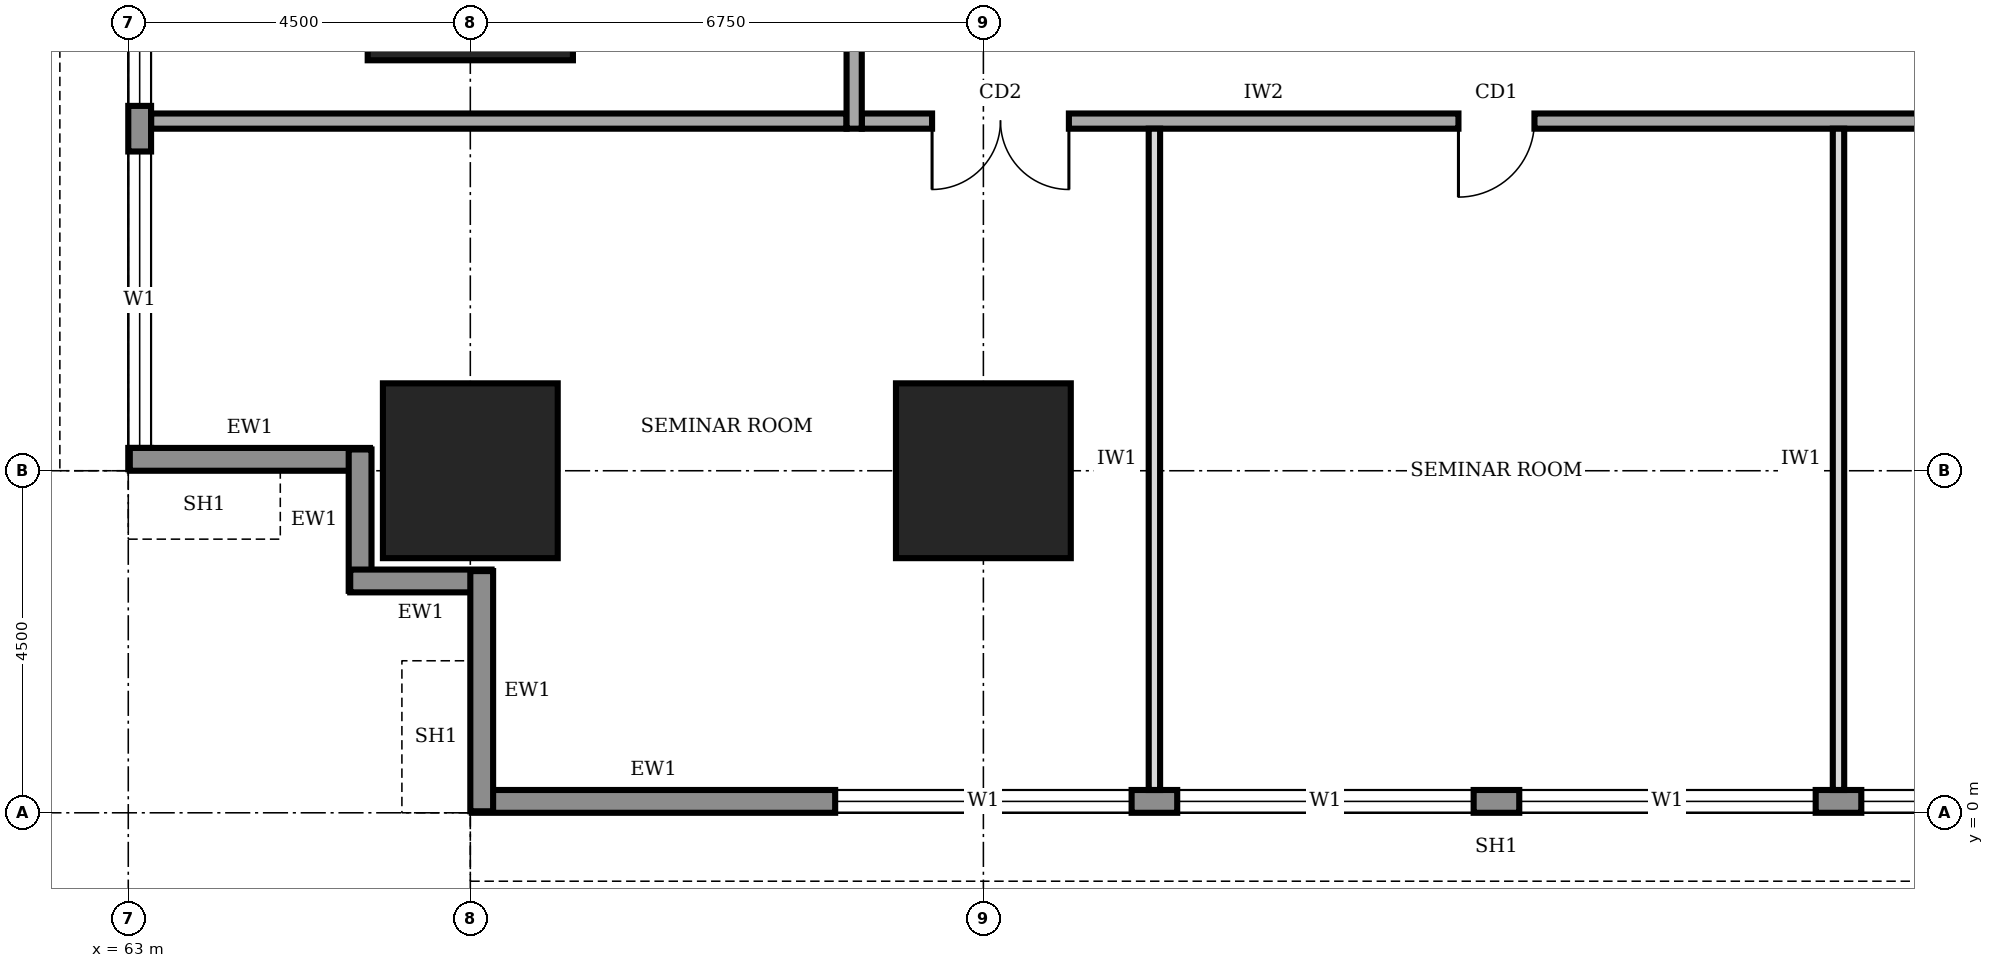
"""IFC4 building model, lengths in metres.
Left out: names, types, materials, properties, quantities, classifications, styles, units other than length and angle.
Written with IfcOpenShell. Run it as: python <this file> out.ifc"""

import sys

from ifc_helpers import new_model, si_unit, direction, frame, frame_2d, origin, origin_2d, place, context, subcontext, project, spatial, rectangle, extrude, element, fill, save


model = new_model("IFC4")
c1 = context("Model", 3, precision=1e-05, world=origin(), true_north=direction((0.0, 1.0)))
c2 = subcontext(c1, "Body", "Model", "MODEL_VIEW")
j1 = project(units=[si_unit("LENGTHUNIT", "METRE"), si_unit("PLANEANGLEUNIT", "RADIAN")], contexts=[c1])
p1 = place(None, origin())
s1 = spatial("IfcSite", under=j1, at=p1, CompositionType="ELEMENT")
p2 = place(p1, origin())
s2 = spatial("IfcBuilding", under=s1, at=p2, CompositionType="ELEMENT")
p3 = place(p2, frame((0.0, 0.0, 25.0)))
s3 = spatial("IfcBuildingStorey", under=s2, at=p3, CompositionType="ELEMENT", Elevation=25.0)
for number, where, z_axis, x_axis in (
    (1, (67.5, 4.5, 0.0), (0.0, 0.0, 1.0), (1.0, 0.0, 0.0)),
    (2, (74.25, 4.5, 0.0), (0.0, 0.0, 1.0), (1.0, 0.0, 0.0)),
):
    element("IfcColumn", number, at=place(p3, frame(where, z_axis=z_axis, x_axis=x_axis)), inside=s3, PredefinedType="COLUMN", context=c2, shape_type="SweptSolid", body=[
        extrude(rectangle(XDim=2.3, YDim=2.3, at=origin_2d()), origin(), (0.0, 0.0, 1.0), 4.0),
    ])
p4 = place(p3, frame((67.5, 11.25, 0.0), z_axis=(0.0, 0.0, 1.0), x_axis=(1.0, 0.0, 0.0)))
e3 = element("IfcColumn", 3, at=p4, inside=s3, PredefinedType="COLUMN", context=c2, shape_type="SweptSolid", body=[
    extrude(rectangle(XDim=2.7, YDim=2.7, at=origin_2d()), origin(), (0.0, 0.0, 1.0), 4.0),
])
p5 = place(p3, frame((67.52, 0.15, 0.0), z_axis=(0.0, 0.0, 1.0), x_axis=(1.0, 0.0, 0.0)))
e4 = element("IfcWall", 4, at=p5, inside=s3, PredefinedType="STANDARD", context=c2, shape_type="SweptSolid", body=[
    extrude(rectangle(XDim=26.96, YDim=0.3, at=frame_2d((13.48, 0.0))), origin(), (0.0, 0.0, 1.0), 3.75),
])
p6 = place(p5, frame((4.78, 0.0, 0.9)))
e5 = element("IfcOpeningElement", 5, at=p6, cuts=e4, PredefinedType="OPENING", context=c2, shape_type="SweptSolid", body=[
    extrude(rectangle(XDim=3.9, YDim=2.2, at=frame_2d((1.95, 1.1))), frame((0.0, 0.16, 0.0), z_axis=(0.0, -1.0, 0.0), x_axis=(1.0, 0.0, 0.0)), (0.0, 0.0, 1.0), 0.32),
])
p7 = place(p5, frame((9.28, 0.0, 0.9)))
e6 = element("IfcOpeningElement", 6, at=p7, cuts=e4, PredefinedType="OPENING", context=c2, shape_type="SweptSolid", body=[
    extrude(rectangle(XDim=3.9, YDim=2.2, at=frame_2d((1.95, 1.1))), frame((0.0, 0.16, 0.0), z_axis=(0.0, -1.0, 0.0), x_axis=(1.0, 0.0, 0.0)), (0.0, 0.0, 1.0), 0.32),
])
p8 = place(p5, frame((13.78, 0.0, 0.9)))
e7 = element("IfcOpeningElement", 7, at=p8, cuts=e4, PredefinedType="OPENING", context=c2, shape_type="SweptSolid", body=[
    extrude(rectangle(XDim=3.9, YDim=2.2, at=frame_2d((1.95, 1.1))), frame((0.0, 0.16, 0.0), z_axis=(0.0, -1.0, 0.0), x_axis=(1.0, 0.0, 0.0)), (0.0, 0.0, 1.0), 0.32),
])
p9 = place(p5, frame((18.28, 0.0, 0.9)))
e8 = element("IfcOpeningElement", 8, at=p9, cuts=e4, PredefinedType="OPENING", context=c2, shape_type="SweptSolid", body=[
    extrude(rectangle(XDim=3.9, YDim=2.2, at=frame_2d((1.95, 1.1))), frame((0.0, 0.16, 0.0), z_axis=(0.0, -1.0, 0.0), x_axis=(1.0, 0.0, 0.0)), (0.0, 0.0, 1.0), 0.32),
])
p10 = place(p5, frame((22.78, 0.0, 0.9)))
e9 = element("IfcOpeningElement", 9, at=p10, cuts=e4, PredefinedType="OPENING", context=c2, shape_type="SweptSolid", body=[
    extrude(rectangle(XDim=3.9, YDim=2.2, at=frame_2d((1.95, 1.1))), frame((0.0, 0.16, 0.0), z_axis=(0.0, -1.0, 0.0), x_axis=(1.0, 0.0, 0.0)), (0.0, 0.0, 1.0), 0.32),
])
p11 = place(p3, frame((63.15, 35.98, 0.0), z_axis=(0.0, 0.0, 1.0), x_axis=(0.0, -1.0, 0.0)))
e10 = element("IfcWall", 10, at=p11, inside=s3, PredefinedType="STANDARD", context=c2, shape_type="SweptSolid", body=[
    extrude(rectangle(XDim=31.46, YDim=0.3, at=frame_2d((15.73, 0.0))), origin(), (0.0, 0.0, 1.0), 3.75),
])
p12 = place(p11, frame((27.28, 0.0, 0.9)))
e11 = element("IfcOpeningElement", 11, at=p12, cuts=e10, PredefinedType="OPENING", context=c2, shape_type="SweptSolid", body=[
    extrude(rectangle(XDim=3.9, YDim=2.2, at=frame_2d((1.95, 1.1))), frame((0.0, 0.16, 0.0), z_axis=(0.0, -1.0, 0.0), x_axis=(1.0, 0.0, 0.0)), (0.0, 0.0, 1.0), 0.32),
])
p13 = place(p11, frame((22.78, 0.0, 0.9)))
e12 = element("IfcOpeningElement", 12, at=p13, cuts=e10, PredefinedType="OPENING", context=c2, shape_type="SweptSolid", body=[
    extrude(rectangle(XDim=3.9, YDim=2.2, at=frame_2d((1.95, 1.1))), frame((0.0, 0.16, 0.0), z_axis=(0.0, -1.0, 0.0), x_axis=(1.0, 0.0, 0.0)), (0.0, 0.0, 1.0), 0.32),
])
p14 = place(p11, frame((18.28, 0.0, 0.9)))
e13 = element("IfcOpeningElement", 13, at=p14, cuts=e10, PredefinedType="OPENING", context=c2, shape_type="SweptSolid", body=[
    extrude(rectangle(XDim=3.9, YDim=2.2, at=frame_2d((1.95, 1.1))), frame((0.0, 0.16, 0.0), z_axis=(0.0, -1.0, 0.0), x_axis=(1.0, 0.0, 0.0)), (0.0, 0.0, 1.0), 0.32),
])
p15 = place(p11, frame((13.78, 0.0, 0.9)))
e14 = element("IfcOpeningElement", 14, at=p15, cuts=e10, PredefinedType="OPENING", context=c2, shape_type="SweptSolid", body=[
    extrude(rectangle(XDim=3.9, YDim=2.2, at=frame_2d((1.95, 1.1))), frame((0.0, 0.16, 0.0), z_axis=(0.0, -1.0, 0.0), x_axis=(1.0, 0.0, 0.0)), (0.0, 0.0, 1.0), 0.32),
])
p16 = place(p11, frame((9.28, 0.0, 0.9)))
e15 = element("IfcOpeningElement", 15, at=p16, cuts=e10, PredefinedType="OPENING", context=c2, shape_type="SweptSolid", body=[
    extrude(rectangle(XDim=3.9, YDim=2.2, at=frame_2d((1.95, 1.1))), frame((0.0, 0.16, 0.0), z_axis=(0.0, -1.0, 0.0), x_axis=(1.0, 0.0, 0.0)), (0.0, 0.0, 1.0), 0.32),
])
p17 = place(p11, frame((4.78, 0.0, 0.9)))
e16 = element("IfcOpeningElement", 16, at=p17, cuts=e10, PredefinedType="OPENING", context=c2, shape_type="SweptSolid", body=[
    extrude(rectangle(XDim=3.9, YDim=2.2, at=frame_2d((1.95, 1.1))), frame((0.0, 0.16, 0.0), z_axis=(0.0, -1.0, 0.0), x_axis=(1.0, 0.0, 0.0)), (0.0, 0.0, 1.0), 0.32),
])
p18 = place(p3, frame((63.02, 4.65, 0.0), z_axis=(0.0, 0.0, 1.0), x_axis=(1.0, 0.0, 0.0)))
e17 = element("IfcWall", 17, at=p18, inside=s3, PredefinedType="STANDARD", context=c2, shape_type="SweptSolid", body=[
    extrude(rectangle(XDim=3.16, YDim=0.3, at=frame_2d((1.58, 0.0))), origin(), (0.0, 0.0, 1.0), 2.85),
])
for number, where, z_axis, x_axis in (
    (18, (66.05, 4.78, 0.0), (0.0, 0.0, 1.0), (0.0, -1.0, 0.0)),
    (19, (65.92, 3.05, 0.0), (0.0, 0.0, 1.0), (1.0, 0.0, 0.0)),
):
    element("IfcWall", number, at=place(p3, frame(where, z_axis=z_axis, x_axis=x_axis)), inside=s3, PredefinedType="STANDARD", context=c2, shape_type="SweptSolid", body=[
        extrude(rectangle(XDim=1.86, YDim=0.3, at=frame_2d((0.93, 0.0))), origin(), (0.0, 0.0, 1.0), 3.75),
    ])
p19 = place(p3, frame((67.65, 3.18, 0.0), z_axis=(0.0, 0.0, 1.0), x_axis=(0.0, -1.0, 0.0)))
e20 = element("IfcWall", 20, at=p19, inside=s3, PredefinedType="STANDARD", context=c2, shape_type="SweptSolid", body=[
    extrude(rectangle(XDim=3.16, YDim=0.3, at=frame_2d((1.58, 0.0))), origin(), (0.0, 0.0, 1.0), 2.85),
])
p20 = place(p3, frame((72.65, 9.1, 0.0), z_axis=(0.0, 0.0, 1.0), x_axis=(1.0, 0.0, 0.0)))
e21 = element("IfcWall", 21, at=p20, inside=s3, PredefinedType="SOLIDWALL", context=c2, shape_type="SweptSolid", body=[
    extrude(rectangle(XDim=16.9, YDim=0.2, at=frame_2d((8.45, 0.0))), origin(), (0.0, 0.0, 1.0), 3.75),
])
p21 = place(p20, frame((0.925, 0.0, 0.0)))
e22 = element("IfcOpeningElement", 22, at=p21, cuts=e21, PredefinedType="OPENING", context=c2, shape_type="SweptSolid", body=[
    extrude(rectangle(XDim=1.8, YDim=2.1, at=frame_2d((0.9, 1.05))), frame((0.0, 0.11, 0.0), z_axis=(0.0, -1.0, 0.0), x_axis=(1.0, 0.0, 0.0)), (0.0, 0.0, 1.0), 0.22),
])
p22 = place(p20, frame((7.85, 0.0, 0.0)))
e23 = element("IfcOpeningElement", 23, at=p22, cuts=e21, PredefinedType="OPENING", context=c2, shape_type="SweptSolid", body=[
    extrude(rectangle(XDim=1.0, YDim=2.1, at=frame_2d((0.5, 1.05))), frame((0.0, 0.11, 0.0), z_axis=(0.0, -1.0, 0.0), x_axis=(1.0, 0.0, 0.0)), (0.0, 0.0, 1.0), 0.22),
])
p23 = place(p20, frame((13.975, 0.0, 0.0)))
e24 = element("IfcOpeningElement", 24, at=p23, cuts=e21, PredefinedType="OPENING", context=c2, shape_type="SweptSolid", body=[
    extrude(rectangle(XDim=1.8, YDim=2.1, at=frame_2d((0.9, 1.05))), frame((0.0, 0.11, 0.0), z_axis=(0.0, -1.0, 0.0), x_axis=(1.0, 0.0, 0.0)), (0.0, 0.0, 1.0), 0.22),
])
p24 = place(p3, frame((72.55, 32.8, 0.0), z_axis=(0.0, 0.0, 1.0), x_axis=(0.0, -1.0, 0.0)))
e25 = element("IfcWall", 25, at=p24, inside=s3, PredefinedType="SOLIDWALL", context=c2, shape_type="SweptSolid", body=[
    extrude(rectangle(XDim=23.8, YDim=0.2, at=frame_2d((11.9, 0.0))), origin(), (0.0, 0.0, 1.0), 3.75),
])
p25 = place(p24, frame((21.05, 0.0, 0.0)))
e26 = element("IfcOpeningElement", 26, at=p25, cuts=e25, PredefinedType="OPENING", context=c2, shape_type="SweptSolid", body=[
    extrude(rectangle(XDim=1.0, YDim=2.1, at=frame_2d((0.5, 1.05))), frame((0.0, 0.11, 0.0), z_axis=(0.0, -1.0, 0.0), x_axis=(1.0, 0.0, 0.0)), (0.0, 0.0, 1.0), 0.22),
])
p26 = place(p24, frame((16.55, 0.0, 0.0)))
e27 = element("IfcOpeningElement", 27, at=p26, cuts=e25, PredefinedType="OPENING", context=c2, shape_type="SweptSolid", body=[
    extrude(rectangle(XDim=1.0, YDim=2.1, at=frame_2d((0.5, 1.05))), frame((0.0, 0.11, 0.0), z_axis=(0.0, -1.0, 0.0), x_axis=(1.0, 0.0, 0.0)), (0.0, 0.0, 1.0), 0.22),
])
p27 = place(p24, frame((12.05, 0.0, 0.0)))
e28 = element("IfcOpeningElement", 28, at=p27, cuts=e25, PredefinedType="OPENING", context=c2, shape_type="SweptSolid", body=[
    extrude(rectangle(XDim=1.0, YDim=2.1, at=frame_2d((0.5, 1.05))), frame((0.0, 0.11, 0.0), z_axis=(0.0, -1.0, 0.0), x_axis=(1.0, 0.0, 0.0)), (0.0, 0.0, 1.0), 0.22),
])
p28 = place(p24, frame((7.55, 0.0, 0.0)))
e29 = element("IfcOpeningElement", 29, at=p28, cuts=e25, PredefinedType="OPENING", context=c2, shape_type="SweptSolid", body=[
    extrude(rectangle(XDim=1.0, YDim=2.1, at=frame_2d((0.5, 1.05))), frame((0.0, 0.11, 0.0), z_axis=(0.0, -1.0, 0.0), x_axis=(1.0, 0.0, 0.0)), (0.0, 0.0, 1.0), 0.22),
])
p29 = place(p24, frame((2.3, 0.0, 0.0)))
e30 = element("IfcOpeningElement", 30, at=p29, cuts=e25, PredefinedType="OPENING", context=c2, shape_type="SweptSolid", body=[
    extrude(rectangle(XDim=1.0, YDim=2.1, at=frame_2d((0.5, 1.05))), frame((0.0, 0.11, 0.0), z_axis=(0.0, -1.0, 0.0), x_axis=(1.0, 0.0, 0.0)), (0.0, 0.0, 1.0), 0.22),
])
p30 = place(p3, frame((63.3, 9.1, 0.0), z_axis=(0.0, 0.0, 1.0), x_axis=(1.0, 0.0, 0.0)))
e31 = element("IfcWall", 31, at=p30, inside=s3, PredefinedType="SOLIDWALL", context=c2, shape_type="SweptSolid", body=[
    extrude(rectangle(XDim=9.15, YDim=0.2, at=frame_2d((4.575, 0.0))), origin(), (0.0, 0.0, 1.0), 3.75),
])
for number, where, z_axis, x_axis in (
    (32, (76.5, 0.3, 0.0), (0.0, 0.0, 1.0), (0.0, 1.0, 0.0)),
    (33, (85.5, 0.3, 0.0), (0.0, 0.0, 1.0), (0.0, 1.0, 0.0)),
):
    element("IfcWall", number, at=place(p3, frame(where, z_axis=z_axis, x_axis=x_axis)), inside=s3, PredefinedType="PARTITIONING", context=c2, shape_type="SweptSolid", body=[
        extrude(rectangle(XDim=8.7, YDim=0.15, at=frame_2d((4.35, 0.0))), origin(), (0.0, 0.0, 1.0), 3.75),
    ])
p31 = place(p6, origin())
e34 = element("IfcWindow", 34, at=p31, inside=s3, PartitioningType="SINGLE_PANEL", PredefinedType="WINDOW", context=c2, shape_type="SweptSolid", body=[
    extrude(rectangle(XDim=3.9, YDim=2.2, at=frame_2d((1.95, 1.1))), frame((0.0, 0.03, 0.0), z_axis=(0.0, -1.0, 0.0), x_axis=(1.0, 0.0, 0.0)), (0.0, 0.0, 1.0), 0.06),
])
fill(e5, e34)
p32 = place(p7, origin())
e35 = element("IfcWindow", 35, at=p32, inside=s3, PartitioningType="SINGLE_PANEL", PredefinedType="WINDOW", context=c2, shape_type="SweptSolid", body=[
    extrude(rectangle(XDim=3.9, YDim=2.2, at=frame_2d((1.95, 1.1))), frame((0.0, 0.03, 0.0), z_axis=(0.0, -1.0, 0.0), x_axis=(1.0, 0.0, 0.0)), (0.0, 0.0, 1.0), 0.06),
])
fill(e6, e35)
p33 = place(p8, origin())
e36 = element("IfcWindow", 36, at=p33, inside=s3, PartitioningType="SINGLE_PANEL", PredefinedType="WINDOW", context=c2, shape_type="SweptSolid", body=[
    extrude(rectangle(XDim=3.9, YDim=2.2, at=frame_2d((1.95, 1.1))), frame((0.0, 0.03, 0.0), z_axis=(0.0, -1.0, 0.0), x_axis=(1.0, 0.0, 0.0)), (0.0, 0.0, 1.0), 0.06),
])
fill(e7, e36)
p34 = place(p9, origin())
e37 = element("IfcWindow", 37, at=p34, inside=s3, PartitioningType="SINGLE_PANEL", PredefinedType="WINDOW", context=c2, shape_type="SweptSolid", body=[
    extrude(rectangle(XDim=3.9, YDim=2.2, at=frame_2d((1.95, 1.1))), frame((0.0, 0.03, 0.0), z_axis=(0.0, -1.0, 0.0), x_axis=(1.0, 0.0, 0.0)), (0.0, 0.0, 1.0), 0.06),
])
fill(e8, e37)
p35 = place(p12, origin())
e38 = element("IfcWindow", 38, at=p35, inside=s3, PartitioningType="SINGLE_PANEL", PredefinedType="WINDOW", context=c2, shape_type="SweptSolid", body=[
    extrude(rectangle(XDim=3.9, YDim=2.2, at=frame_2d((1.95, 1.1))), frame((0.0, 0.03, 0.0), z_axis=(0.0, -1.0, 0.0), x_axis=(1.0, 0.0, 0.0)), (0.0, 0.0, 1.0), 0.06),
])
fill(e11, e38)
p36 = place(p13, origin())
e39 = element("IfcWindow", 39, at=p36, inside=s3, PartitioningType="SINGLE_PANEL", PredefinedType="WINDOW", context=c2, shape_type="SweptSolid", body=[
    extrude(rectangle(XDim=3.9, YDim=2.2, at=frame_2d((1.95, 1.1))), frame((0.0, 0.03, 0.0), z_axis=(0.0, -1.0, 0.0), x_axis=(1.0, 0.0, 0.0)), (0.0, 0.0, 1.0), 0.06),
])
fill(e12, e39)
p37 = place(p21, frame((1.8, 0.0, 0.0), z_axis=(0.0, 0.0, 1.0), x_axis=(-1.0, 0.0, 0.0)))
e40 = element("IfcDoor", 40, at=p37, inside=s3, OperationType="DOUBLE_DOOR_SINGLE_SWING", PredefinedType="DOOR", context=c2, shape_type="SweptSolid", body=[
    extrude(rectangle(XDim=1.8, YDim=2.1, at=frame_2d((0.9, 1.05))), frame((0.0, 0.025, 0.0), z_axis=(0.0, -1.0, 0.0), x_axis=(1.0, 0.0, 0.0)), (0.0, 0.0, 1.0), 0.05),
])
fill(e22, e40)
p38 = place(p22, frame((1.0, 0.0, 0.0), z_axis=(0.0, 0.0, 1.0), x_axis=(-1.0, 0.0, 0.0)))
e41 = element("IfcDoor", 41, at=p38, inside=s3, OperationType="SINGLE_SWING_RIGHT", PredefinedType="DOOR", context=c2, shape_type="SweptSolid", body=[
    extrude(rectangle(XDim=1.0, YDim=2.1, at=frame_2d((0.5, 1.05))), frame((0.0, 0.025, 0.0), z_axis=(0.0, -1.0, 0.0), x_axis=(1.0, 0.0, 0.0)), (0.0, 0.0, 1.0), 0.05),
])
fill(e23, e41)
save(model, sys.argv[1])
